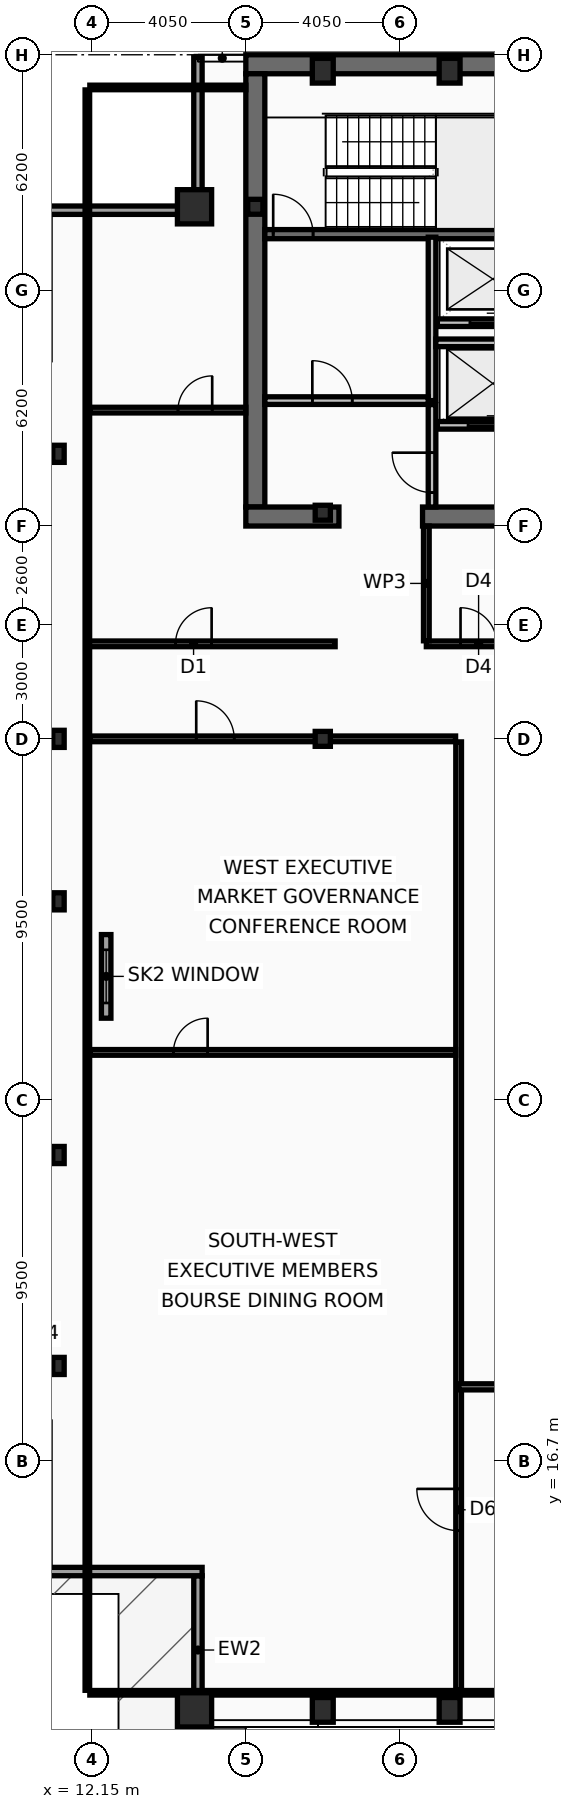
"""IFC4 building model, lengths in metres.
Left out: names, types, materials, properties, quantities, classifications, styles, units other than length and angle.
Written with IfcOpenShell. Run it as: python <this file> out.ifc"""

import sys

from ifc_helpers import new_model, si_unit, direction, frame, frame_2d, origin, origin_2d, place, context, subcontext, project, spatial, rectangle, hollow_rectangle, i_section, extrude, element, fill, save


model = new_model("IFC4")
c1 = context("Model", 3, precision=1e-05, world=origin(), true_north=direction((0.0, 1.0)))
c2 = subcontext(c1, "Body", "Model", "MODEL_VIEW")
j1 = project(units=[si_unit("LENGTHUNIT", "METRE"), si_unit("PLANEANGLEUNIT", "RADIAN")], contexts=[c1])
p1 = place(None, origin())
s1 = spatial("IfcSite", under=j1, at=p1, CompositionType="ELEMENT")
p2 = place(p1, origin())
s2 = spatial("IfcBuilding", under=s1, at=p2, CompositionType="ELEMENT")
p3 = place(p2, frame((0.0, 0.0, 291.4)))
s3 = spatial("IfcBuildingStorey", under=s2, at=p3, CompositionType="ELEMENT", Elevation=291.4)
p4 = place(p3, frame((16.2, 53.45, 0.0), z_axis=(0.0, 0.0, 1.0), x_axis=(1.0, 0.0, 0.0)))
e1 = element("IfcWall", 1, at=p4, inside=s3, PredefinedType="SHEAR", context=c2, shape_type="SweptSolid", body=[
    extrude(rectangle(XDim=40.5, YDim=0.5, at=frame_2d((20.25, 0.0))), origin(), (0.0, 0.0, 1.0), 3.44),
])
p5 = place(p3, frame((16.45, 41.8, 0.0), z_axis=(0.0, 0.0, 1.0), x_axis=(0.0, 1.0, 0.0)))
e2 = element("IfcWall", 2, at=p5, inside=s3, PredefinedType="SHEAR", context=c2, shape_type="SweptSolid", body=[
    extrude(rectangle(XDim=11.4, YDim=0.5, at=frame_2d((5.7, 0.0))), origin(), (0.0, 0.0, 1.0), 3.44),
])
p6 = place(p3, frame((18.65, 41.55, 0.0), z_axis=(0.0, 0.0, 1.0), x_axis=(-1.0, 0.0, 0.0)))
e3 = element("IfcWall", 3, at=p6, inside=s3, PredefinedType="SHEAR", context=c2, shape_type="SweptSolid", body=[
    extrude(rectangle(XDim=2.45, YDim=0.5, at=frame_2d((1.225, 0.0))), origin(), (0.0, 0.0, 1.0), 3.44),
])
p7 = place(p3, frame((32.3, 41.55, 0.0), z_axis=(0.0, 0.0, 1.0), x_axis=(-1.0, 0.0, 0.0)))
e4 = element("IfcWall", 4, at=p7, inside=s3, PredefinedType="SHEAR", context=c2, shape_type="SweptSolid", body=[
    extrude(rectangle(XDim=11.45, YDim=0.5, at=frame_2d((5.725, 0.0))), origin(), (0.0, 0.0, 1.0), 3.44),
])
p8 = place(p3, frame((16.7, 48.98, 0.0), z_axis=(0.0, 0.0, 1.0), x_axis=(1.0, 0.0, 0.0)))
e5 = element("IfcWall", 5, at=p8, inside=s3, PredefinedType="SHEAR", context=c2, shape_type="SweptSolid", body=[
    extrude(rectangle(XDim=7.52, YDim=0.24, at=frame_2d((3.76, 0.0))), origin(), (0.0, 0.0, 1.0), 3.44),
])
p9 = place(p8, frame((0.22, 0.0, 0.0)))
e6 = element("IfcOpeningElement", 6, at=p9, cuts=e5, PredefinedType="OPENING", context=c2, shape_type="SweptSolid", body=[
    extrude(rectangle(XDim=1.05, YDim=2.15, at=frame_2d((0.525, 1.075))), frame((0.0, 0.13, 0.0), z_axis=(0.0, -1.0, 0.0), x_axis=(1.0, 0.0, 0.0)), (0.0, 0.0, 1.0), 0.26),
])
for number, where, z_axis, x_axis in (
    (7, (14.85, 10.15, 0.0), (0.0, 0.0, 1.0), (1.0, 0.0, 0.0)),
    (8, (14.85, 49.7, 0.0), (0.0, 0.0, 1.0), (1.0, 0.0, 0.0)),
):
    element("IfcColumn", number, at=place(p3, frame(where, z_axis=z_axis, x_axis=x_axis)), inside=s3, PredefinedType="COLUMN", context=c2, shape_type="SweptSolid", body=[
        extrude(hollow_rectangle(XDim=0.9, YDim=0.9, WallThickness=0.05, at=origin_2d()), origin(), (0.0, 0.0, 1.0), 3.6),
    ])
for number, where, z_axis, x_axis in (
    (9, (18.225, 10.15, 0.0), (0.0, 0.0, 1.0), (1.0, 0.0, 0.0)),
    (10, (21.562, 10.15, 0.0), (0.0, 0.0, 1.0), (1.0, 0.0, 0.0)),
    (11, (18.225, 53.28, 0.0), (0.0, 0.0, 1.0), (1.0, 0.0, 0.0)),
    (12, (21.562, 53.28, 0.0), (0.0, 0.0, 1.0), (1.0, 0.0, 0.0)),
):
    element("IfcColumn", number, at=place(p3, frame(where, z_axis=z_axis, x_axis=x_axis)), inside=s3, PredefinedType="COLUMN", context=c2, shape_type="SweptSolid", body=[
        extrude(hollow_rectangle(XDim=0.55, YDim=0.65, WallThickness=0.04, at=origin_2d()), origin(), (0.0, 0.0, 1.0), 3.6),
    ])
for number, where, z_axis, x_axis in (
    (13, (11.27, 19.2, 0.0), (0.0, 0.0, 1.0), (1.0, 0.0, 0.0)),
    (14, (11.27, 24.75, 0.0), (0.0, 0.0, 1.0), (1.0, 0.0, 0.0)),
    (15, (11.27, 31.425, 0.0), (0.0, 0.0, 1.0), (1.0, 0.0, 0.0)),
    (16, (11.27, 35.7, 0.0), (0.0, 0.0, 1.0), (1.0, 0.0, 0.0)),
    (17, (11.27, 43.2, 0.0), (0.0, 0.0, 1.0), (1.0, 0.0, 0.0)),
):
    element("IfcColumn", number, at=place(p3, frame(where, z_axis=z_axis, x_axis=x_axis)), inside=s3, PredefinedType="COLUMN", context=c2, shape_type="SweptSolid", body=[
        extrude(i_section(OverallWidth=0.3, OverallDepth=0.45, WebThickness=0.014, FlangeThickness=0.026, at=origin_2d()), origin(), (0.0, 0.0, 1.0), 3.6),
    ])
for number, where, z_axis, x_axis in (
    (18, (16.45, 49.7, 0.0), (0.0, 0.0, 1.0), (1.0, 0.0, 0.0)),
    (19, (18.225, 35.7, 0.0), (0.0, 0.0, 1.0), (1.0, 0.0, 0.0)),
    (20, (18.225, 41.65, 0.0), (0.0, 0.0, 1.0), (1.0, 0.0, 0.0)),
):
    element("IfcColumn", number, at=place(p3, frame(where, z_axis=z_axis, x_axis=x_axis)), inside=s3, PredefinedType="COLUMN", context=c2, shape_type="SweptSolid", body=[
        extrude(i_section(OverallWidth=0.399, OverallDepth=0.393, WebThickness=0.023, FlangeThickness=0.037, at=origin_2d()), origin(), (0.0, 0.0, 1.0), 3.6),
    ])
p10 = place(p3, frame((14.94, 9.77, 0.0), z_axis=(0.0, 0.0, 1.0), x_axis=(0.0, 1.0, 0.0)))
e21 = element("IfcWall", 21, at=p10, inside=s3, PredefinedType="SOLIDWALL", context=c2, shape_type="SweptSolid", body=[
    extrude(rectangle(XDim=3.91, YDim=0.22, at=frame_2d((1.955, 0.0))), origin(), (0.0, 0.0, 1.0), 2.88),
])
for number, where, z_axis, x_axis in (
    (22, (15.05, 13.79, 0.0), (0.0, 0.0, 1.0), (-1.0, 0.0, 0.0)),
    (23, (10.83, 49.61, 0.0), (0.0, 0.0, 1.0), (1.0, 0.0, 0.0)),
):
    element("IfcWall", number, at=place(p3, frame(where, z_axis=z_axis, x_axis=x_axis)), inside=s3, PredefinedType="SOLIDWALL", context=c2, shape_type="SweptSolid", body=[
        extrude(rectangle(XDim=4.22, YDim=0.22, at=frame_2d((2.11, 0.0))), origin(), (0.0, 0.0, 1.0), 2.88),
    ])
p11 = place(p3, frame((14.94, 49.72, 0.0), z_axis=(0.0, 0.0, 1.0), x_axis=(0.0, 1.0, 0.0)))
e24 = element("IfcWall", 24, at=p11, inside=s3, PredefinedType="SOLIDWALL", context=c2, shape_type="SweptSolid", body=[
    extrude(rectangle(XDim=3.91, YDim=0.22, at=frame_2d((1.955, 0.0))), origin(), (0.0, 0.0, 1.0), 2.88),
])
p12 = place(p3, frame((12.525, 28.35, 0.0), z_axis=(0.0, 0.0, 1.0), x_axis=(0.0, 1.0, 0.0)))
e25 = element("IfcWall", 25, at=p12, inside=s3, PredefinedType="PARAPET", context=c2, shape_type="SweptSolid", body=[
    extrude(rectangle(XDim=2.2, YDim=0.25, at=frame_2d((1.1, 0.0))), origin(), (0.0, 0.0, 1.0), 0.88),
])
p13 = place(p12, frame((0.4, 0.0, 0.16)))
e26 = element("IfcOpeningElement", 26, at=p13, cuts=e25, PredefinedType="OPENING", context=c2, shape_type="SweptSolid", body=[
    extrude(rectangle(XDim=1.4, YDim=0.5, at=frame_2d((0.7, 0.25))), frame((0.0, 0.135, 0.0), z_axis=(0.0, -1.0, 0.0), x_axis=(1.0, 0.0, 0.0)), (0.0, 0.0, 1.0), 0.27),
])
p14 = place(p3, frame((24.21, 43.95, 0.0), z_axis=(0.0, 0.0, 1.0), x_axis=(-1.0, 0.0, 0.0)))
e27 = element("IfcWall", 27, at=p14, inside=s3, PredefinedType="PARTITIONING", context=c2, shape_type="SweptSolid", body=[
    extrude(rectangle(XDim=2.97, YDim=0.2, at=frame_2d((1.485, 0.0))), origin(), (0.0, 0.0, 1.0), 3.44),
])
p15 = place(p14, frame((0.86, 0.0, 0.0)))
e28 = element("IfcOpeningElement", 28, at=p15, cuts=e27, PredefinedType="OPENING", context=c2, shape_type="SweptSolid", body=[
    extrude(rectangle(XDim=1.3, YDim=2.18, at=frame_2d((0.65, 1.09))), frame((0.0, 0.11, 0.0), z_axis=(0.0, -1.0, 0.0), x_axis=(1.0, 0.0, 0.0)), (0.0, 0.0, 1.0), 0.22),
])
p16 = place(p3, frame((24.21, 46.65, 0.0), z_axis=(0.0, 0.0, 1.0), x_axis=(-1.0, 0.0, 0.0)))
e29 = element("IfcWall", 29, at=p16, inside=s3, PredefinedType="PARTITIONING", context=c2, shape_type="SweptSolid", body=[
    extrude(rectangle(XDim=2.97, YDim=0.2, at=frame_2d((1.485, 0.0))), origin(), (0.0, 0.0, 1.0), 3.44),
])
p17 = place(p16, frame((0.91, 0.0, 0.0)))
e30 = element("IfcOpeningElement", 30, at=p17, cuts=e29, PredefinedType="OPENING", context=c2, shape_type="SweptSolid", body=[
    extrude(rectangle(XDim=1.2, YDim=2.18, at=frame_2d((0.6, 1.09))), frame((0.0, 0.11, 0.0), z_axis=(0.0, -1.0, 0.0), x_axis=(1.0, 0.0, 0.0)), (0.0, 0.0, 1.0), 0.22),
])
p18 = place(p3, frame((21.1, 44.6, 0.0), z_axis=(0.0, 0.0, 1.0), x_axis=(0.0, 1.0, 0.0)))
e31 = element("IfcWall", 31, at=p18, inside=s3, PredefinedType="PARTITIONING", context=c2, shape_type="SweptSolid", body=[
    extrude(rectangle(XDim=4.3, YDim=0.2, at=frame_2d((2.15, 0.0))), origin(), (0.0, 0.0, 1.0), 3.44),
])
p19 = place(p3, frame((16.7, 44.6, 0.0), z_axis=(0.0, 0.0, 1.0), x_axis=(1.0, 0.0, 0.0)))
e32 = element("IfcWall", 32, at=p19, inside=s3, PredefinedType="PARTITIONING", context=c2, shape_type="SweptSolid", body=[
    extrude(rectangle(XDim=4.3, YDim=0.2, at=frame_2d((2.15, 0.0))), origin(), (0.0, 0.0, 1.0), 3.44),
])
p20 = place(p19, frame((1.25, 0.0, 0.0)))
e33 = element("IfcOpeningElement", 33, at=p20, cuts=e32, PredefinedType="OPENING", context=c2, shape_type="SweptSolid", body=[
    extrude(rectangle(XDim=1.05, YDim=2.15, at=frame_2d((0.525, 1.075))), frame((0.0, 0.11, 0.0), z_axis=(0.0, -1.0, 0.0), x_axis=(1.0, 0.0, 0.0)), (0.0, 0.0, 1.0), 0.22),
])
p21 = place(p3, frame((21.2, 46.12, 0.0), z_axis=(0.0, 0.0, 1.0), x_axis=(1.0, 0.0, 0.0)))
e34 = element("IfcWall", 34, at=p21, inside=s3, PredefinedType="PARTITIONING", context=c2, shape_type="SweptSolid", body=[
    extrude(rectangle(XDim=3.02, YDim=0.2, at=frame_2d((1.51, 0.0))), origin(), (0.0, 0.0, 1.0), 3.44),
])
p22 = place(p3, frame((21.1, 41.8, 0.0), z_axis=(0.0, 0.0, 1.0), x_axis=(0.0, 1.0, 0.0)))
e35 = element("IfcWall", 35, at=p22, inside=s3, PredefinedType="PARTITIONING", context=c2, shape_type="SweptSolid", body=[
    extrude(rectangle(XDim=2.695, YDim=0.2, at=frame_2d((1.348, 0.0))), origin(), (0.0, 0.0, 1.0), 3.44),
])
p23 = place(p22, frame((0.38, 0.0, 0.0)))
e36 = element("IfcOpeningElement", 36, at=p23, cuts=e35, PredefinedType="OPENING", context=c2, shape_type="SweptSolid", body=[
    extrude(rectangle(XDim=1.05, YDim=2.15, at=frame_2d((0.525, 1.075))), frame((0.0, 0.11, 0.0), z_axis=(0.0, -1.0, 0.0), x_axis=(1.0, 0.0, 0.0)), (0.0, 0.0, 1.0), 0.22),
])
p24 = place(p3, frame((20.95, 38.2, 0.0), z_axis=(0.0, 0.0, 1.0), x_axis=(1.0, 0.0, 0.0)))
e37 = element("IfcWall", 37, at=p24, inside=s3, PredefinedType="PARTITIONING", context=c2, shape_type="SweptSolid", body=[
    extrude(rectangle(XDim=3.75, YDim=0.15, at=frame_2d((1.875, 0.0))), origin(), (0.0, 0.0, 1.0), 2.78),
])
p25 = place(p24, frame((0.9, 0.0, 0.0)))
e38 = element("IfcOpeningElement", 38, at=p25, cuts=e37, PredefinedType="OPENING", context=c2, shape_type="SweptSolid", body=[
    extrude(rectangle(XDim=0.95, YDim=2.05, at=frame_2d((0.475, 1.025))), frame((0.0, 0.085, 0.0), z_axis=(0.0, -1.0, 0.0), x_axis=(1.0, 0.0, 0.0)), (0.0, 0.0, 1.0), 0.17),
])
p26 = place(p3, frame((20.95, 38.28, 0.0), z_axis=(0.0, 0.0, 1.0), x_axis=(0.0, 1.0, 0.0)))
e39 = element("IfcWall", 39, at=p26, inside=s3, PredefinedType="PARTITIONING", context=c2, shape_type="SweptSolid", body=[
    extrude(rectangle(XDim=3.02, YDim=0.15, at=frame_2d((1.51, 0.0))), origin(), (0.0, 0.0, 1.0), 3.44),
])
p27 = place(p3, frame((12.03, 38.2, 0.0), z_axis=(0.0, 0.0, 1.0), x_axis=(1.0, 0.0, 0.0)))
e40 = element("IfcWall", 40, at=p27, inside=s3, PredefinedType="PARTITIONING", context=c2, shape_type="SweptSolid", body=[
    extrude(rectangle(XDim=6.52, YDim=0.15, at=frame_2d((3.26, 0.0))), origin(), (0.0, 0.0, 1.0), 2.78),
])
p28 = place(p27, frame((2.32, 0.0, 0.0)))
e41 = element("IfcOpeningElement", 41, at=p28, cuts=e40, PredefinedType="OPENING", context=c2, shape_type="SweptSolid", body=[
    extrude(rectangle(XDim=0.95, YDim=2.05, at=frame_2d((0.475, 1.025))), frame((0.0, 0.085, 0.0), z_axis=(0.0, -1.0, 0.0), x_axis=(1.0, 0.0, 0.0)), (0.0, 0.0, 1.0), 0.17),
])
p29 = place(p3, frame((12.095, 44.35, 0.0), z_axis=(0.0, 0.0, 1.0), x_axis=(1.0, 0.0, 0.0)))
e42 = element("IfcWall", 42, at=p29, inside=s3, PredefinedType="PARTITIONING", context=c2, shape_type="SweptSolid", body=[
    extrude(rectangle(XDim=4.105, YDim=0.15, at=frame_2d((2.052, 0.0))), origin(), (0.0, 0.0, 1.0), 2.88),
])
p30 = place(p29, frame((2.32, 0.0, 0.0)))
e43 = element("IfcOpeningElement", 43, at=p30, cuts=e42, PredefinedType="OPENING", context=c2, shape_type="SweptSolid", body=[
    extrude(rectangle(XDim=0.9, YDim=2.05, at=frame_2d((0.45, 1.025))), frame((0.0, 0.085, 0.0), z_axis=(0.0, -1.0, 0.0), x_axis=(1.0, 0.0, 0.0)), (0.0, 0.0, 1.0), 0.17),
])
p31 = place(p3, frame((21.8, 10.665, 0.0), z_axis=(0.0, 0.0, 1.0), x_axis=(0.0, 1.0, 0.0)))
e44 = element("IfcWall", 44, at=p31, inside=s3, PredefinedType="PARTITIONING", context=c2, shape_type="SweptSolid", body=[
    extrude(rectangle(XDim=24.955, YDim=0.15, at=frame_2d((12.478, 0.0))), origin(), (0.0, 0.0, 1.0), 3.03),
])
p32 = place(p31, frame((4.2, 0.0, 0.0)))
e45 = element("IfcOpeningElement", 45, at=p32, cuts=e44, PredefinedType="OPENING", context=c2, shape_type="SweptSolid", body=[
    extrude(rectangle(XDim=1.1, YDim=2.1, at=frame_2d((0.55, 1.05))), frame((0.0, 0.085, 0.0), z_axis=(0.0, -1.0, 0.0), x_axis=(1.0, 0.0, 0.0)), (0.0, 0.0, 1.0), 0.17),
])
p33 = place(p3, frame((12.095, 35.7, 0.0), z_axis=(0.0, 0.0, 1.0), x_axis=(1.0, 0.0, 0.0)))
e46 = element("IfcWall", 46, at=p33, inside=s3, PredefinedType="PARTITIONING", context=c2, shape_type="SweptSolid", body=[
    extrude(rectangle(XDim=9.625, YDim=0.15, at=frame_2d((4.812, 0.0))), origin(), (0.0, 0.0, 1.0), 2.78),
])
p34 = place(p33, frame((2.8, 0.0, 0.0)))
e47 = element("IfcOpeningElement", 47, at=p34, cuts=e46, PredefinedType="OPENING", context=c2, shape_type="SweptSolid", body=[
    extrude(rectangle(XDim=1.0, YDim=2.05, at=frame_2d((0.5, 1.025))), frame((0.0, 0.085, 0.0), z_axis=(0.0, -1.0, 0.0), x_axis=(1.0, 0.0, 0.0)), (0.0, 0.0, 1.0), 0.17),
])
p35 = place(p3, frame((12.095, 27.45, 0.0), z_axis=(0.0, 0.0, 1.0), x_axis=(1.0, 0.0, 0.0)))
e48 = element("IfcWall", 48, at=p35, inside=s3, PredefinedType="PARTITIONING", context=c2, shape_type="SweptSolid", body=[
    extrude(rectangle(XDim=9.625, YDim=0.15, at=frame_2d((4.812, 0.0))), origin(), (0.0, 0.0, 1.0), 2.78),
])
p36 = place(p35, frame((2.2, 0.0, 0.0)))
e49 = element("IfcOpeningElement", 49, at=p36, cuts=e48, PredefinedType="OPENING", context=c2, shape_type="SweptSolid", body=[
    extrude(rectangle(XDim=0.9, YDim=2.05, at=frame_2d((0.45, 1.025))), frame((0.0, 0.085, 0.0), z_axis=(0.0, -1.0, 0.0), x_axis=(1.0, 0.0, 0.0)), (0.0, 0.0, 1.0), 0.17),
])
p37 = place(p3, frame((21.8, 18.65, 0.0), z_axis=(0.0, 0.0, 1.0), x_axis=(1.0, 0.0, 0.0)))
e50 = element("IfcWall", 50, at=p37, inside=s3, PredefinedType="PARTITIONING", context=c2, shape_type="SweptSolid", body=[
    extrude(rectangle(XDim=10.032, YDim=0.16, at=frame_2d((5.016, 0.0))), origin(), (0.0, 0.0, 1.0), 2.78),
])
p38 = place(p37, frame((4.213, 0.0, 0.0)))
e51 = element("IfcOpeningElement", 51, at=p38, cuts=e50, PredefinedType="OPENING", context=c2, shape_type="SweptSolid", body=[
    extrude(rectangle(XDim=1.0, YDim=2.05, at=frame_2d((0.5, 1.025))), frame((0.0, 0.09, 0.0), z_axis=(0.0, -1.0, 0.0), x_axis=(1.0, 0.0, 0.0)), (0.0, 0.0, 1.0), 0.18),
])
p39 = place(p3, frame((12.03, 10.665, 0.0), z_axis=(0.0, 0.0, 1.0), x_axis=(0.0, 1.0, 0.0)))
e52 = element("IfcWall", 52, at=p39, inside=s3, PredefinedType="PARTITIONING", context=c2, shape_type="SweptSolid", body=[
    extrude(rectangle(XDim=42.11, YDim=0.12, at=frame_2d((21.055, 0.0))), origin(), (0.0, 0.0, 1.0), 2.78),
])
p40 = place(p3, frame((12.095, 52.84, 0.0), z_axis=(0.0, 0.0, 1.0), x_axis=(1.0, 0.0, 0.0)))
e53 = element("IfcWall", 53, at=p40, inside=s3, PredefinedType="PARTITIONING", context=c2, shape_type="SweptSolid", body=[
    extrude(rectangle(XDim=4.105, YDim=0.12, at=frame_2d((2.052, 0.0))), origin(), (0.0, 0.0, 1.0), 3.44),
])
p41 = place(p3, frame((12.095, 10.6, 0.0), z_axis=(0.0, 0.0, 1.0), x_axis=(1.0, 0.0, 0.0)))
e54 = element("IfcWall", 54, at=p41, inside=s3, PredefinedType="PARTITIONING", context=c2, shape_type="SweptSolid", body=[
    extrude(rectangle(XDim=48.71, YDim=0.12, at=frame_2d((24.355, 0.0))), origin(), (0.0, 0.0, 1.0), 2.78),
])
p42 = place(p13, origin())
e55 = element("IfcWindow", 55, at=p42, inside=s3, PartitioningType="SINGLE_PANEL", PredefinedType="SKYLIGHT", context=c2, shape_type="SweptSolid", body=[
    extrude(rectangle(XDim=1.4, YDim=0.5, at=frame_2d((0.7, 0.25))), frame((0.0, 0.03, 0.0), z_axis=(0.0, -1.0, 0.0), x_axis=(1.0, 0.0, 0.0)), (0.0, 0.0, 1.0), 0.06),
])
fill(e26, e55)
p43 = place(p9, origin())
e56 = element("IfcDoor", 56, at=p43, inside=s3, OperationType="SINGLE_SWING_LEFT", PredefinedType="DOOR", context=c2, shape_type="SweptSolid", body=[
    extrude(rectangle(XDim=1.05, YDim=2.15, at=frame_2d((0.525, 1.075))), frame((0.0, 0.025, 0.0), z_axis=(0.0, -1.0, 0.0), x_axis=(1.0, 0.0, 0.0)), (0.0, 0.0, 1.0), 0.05),
])
fill(e6, e56)
p44 = place(p15, origin())
e57 = element("IfcDoor", 57, at=p44, inside=s3, OperationType="SLIDING_TO_LEFT", PredefinedType="DOOR", context=c2, shape_type="SweptSolid", body=[
    extrude(rectangle(XDim=1.3, YDim=2.18, at=frame_2d((0.65, 1.09))), frame((0.0, 0.025, 0.0), z_axis=(0.0, -1.0, 0.0), x_axis=(1.0, 0.0, 0.0)), (0.0, 0.0, 1.0), 0.05),
])
fill(e28, e57)
p45 = place(p17, origin())
e58 = element("IfcDoor", 58, at=p45, inside=s3, OperationType="SLIDING_TO_LEFT", PredefinedType="DOOR", context=c2, shape_type="SweptSolid", body=[
    extrude(rectangle(XDim=1.2, YDim=2.18, at=frame_2d((0.6, 1.09))), frame((0.0, 0.025, 0.0), z_axis=(0.0, -1.0, 0.0), x_axis=(1.0, 0.0, 0.0)), (0.0, 0.0, 1.0), 0.05),
])
fill(e30, e58)
p46 = place(p20, origin())
e59 = element("IfcDoor", 59, at=p46, inside=s3, OperationType="SINGLE_SWING_LEFT", PredefinedType="DOOR", context=c2, shape_type="SweptSolid", body=[
    extrude(rectangle(XDim=1.05, YDim=2.15, at=frame_2d((0.525, 1.075))), frame((0.0, 0.025, 0.0), z_axis=(0.0, -1.0, 0.0), x_axis=(1.0, 0.0, 0.0)), (0.0, 0.0, 1.0), 0.05),
])
fill(e33, e59)
p47 = place(p23, origin())
e60 = element("IfcDoor", 60, at=p47, inside=s3, OperationType="SINGLE_SWING_RIGHT", PredefinedType="DOOR", context=c2, shape_type="SweptSolid", body=[
    extrude(rectangle(XDim=1.05, YDim=2.15, at=frame_2d((0.525, 1.075))), frame((0.0, 0.025, 0.0), z_axis=(0.0, -1.0, 0.0), x_axis=(1.0, 0.0, 0.0)), (0.0, 0.0, 1.0), 0.05),
])
fill(e36, e60)
p48 = place(p25, origin())
e61 = element("IfcDoor", 61, at=p48, inside=s3, OperationType="SINGLE_SWING_LEFT", PredefinedType="DOOR", context=c2, shape_type="SweptSolid", body=[
    extrude(rectangle(XDim=0.95, YDim=2.05, at=frame_2d((0.475, 1.025))), frame((0.0, 0.025, 0.0), z_axis=(0.0, -1.0, 0.0), x_axis=(1.0, 0.0, 0.0)), (0.0, 0.0, 1.0), 0.05),
])
fill(e38, e61)
p49 = place(p28, origin())
e62 = element("IfcDoor", 62, at=p49, inside=s3, OperationType="SINGLE_SWING_RIGHT", PredefinedType="DOOR", context=c2, shape_type="SweptSolid", body=[
    extrude(rectangle(XDim=0.95, YDim=2.05, at=frame_2d((0.475, 1.025))), frame((0.0, 0.025, 0.0), z_axis=(0.0, -1.0, 0.0), x_axis=(1.0, 0.0, 0.0)), (0.0, 0.0, 1.0), 0.05),
])
fill(e41, e62)
p50 = place(p30, origin())
e63 = element("IfcDoor", 63, at=p50, inside=s3, OperationType="SINGLE_SWING_RIGHT", PredefinedType="DOOR", context=c2, shape_type="SweptSolid", body=[
    extrude(rectangle(XDim=0.9, YDim=2.05, at=frame_2d((0.45, 1.025))), frame((0.0, 0.025, 0.0), z_axis=(0.0, -1.0, 0.0), x_axis=(1.0, 0.0, 0.0)), (0.0, 0.0, 1.0), 0.05),
])
fill(e43, e63)
p51 = place(p32, origin())
e64 = element("IfcDoor", 64, at=p51, inside=s3, OperationType="SINGLE_SWING_RIGHT", PredefinedType="DOOR", context=c2, shape_type="SweptSolid", body=[
    extrude(rectangle(XDim=1.1, YDim=2.1, at=frame_2d((0.55, 1.05))), frame((0.0, 0.025, 0.0), z_axis=(0.0, -1.0, 0.0), x_axis=(1.0, 0.0, 0.0)), (0.0, 0.0, 1.0), 0.05),
])
fill(e45, e64)
p52 = place(p34, origin())
e65 = element("IfcDoor", 65, at=p52, inside=s3, OperationType="SINGLE_SWING_LEFT", PredefinedType="DOOR", context=c2, shape_type="SweptSolid", body=[
    extrude(rectangle(XDim=1.0, YDim=2.05, at=frame_2d((0.5, 1.025))), frame((0.0, 0.025, 0.0), z_axis=(0.0, -1.0, 0.0), x_axis=(1.0, 0.0, 0.0)), (0.0, 0.0, 1.0), 0.05),
])
fill(e47, e65)
p53 = place(p36, origin())
e66 = element("IfcDoor", 66, at=p53, inside=s3, OperationType="SINGLE_SWING_RIGHT", PredefinedType="DOOR", context=c2, shape_type="SweptSolid", body=[
    extrude(rectangle(XDim=0.9, YDim=2.05, at=frame_2d((0.45, 1.025))), frame((0.0, 0.025, 0.0), z_axis=(0.0, -1.0, 0.0), x_axis=(1.0, 0.0, 0.0)), (0.0, 0.0, 1.0), 0.05),
])
fill(e49, e66)
save(model, sys.argv[1])
